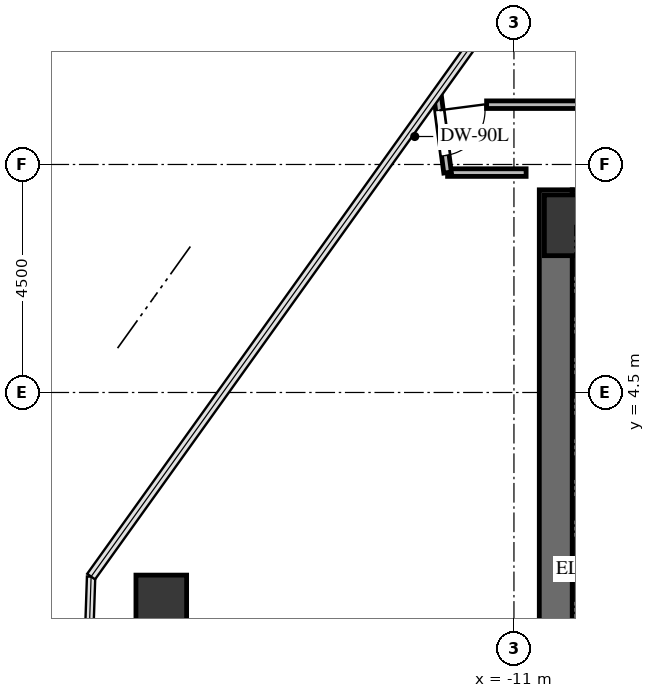
"""IFC4 building model, lengths in metres.
Left out: names, types, materials, properties, quantities, classifications, styles, units other than length and angle.
Written with IfcOpenShell. Run it as: python <this file> out.ifc"""

import sys

from ifc_helpers import new_model, si_unit, direction, frame, frame_2d, origin, origin_2d, place, context, subcontext, project, spatial, rectangle, extrude, source, transform, mapped, element, fill, save


model = new_model("IFC4")
c1 = context("Model", 3, precision=1e-05, world=origin(), true_north=direction((0.0, 1.0)))
c2 = subcontext(c1, "Body", "Model", "MODEL_VIEW")
j1 = project(units=[si_unit("LENGTHUNIT", "METRE"), si_unit("PLANEANGLEUNIT", "RADIAN")], contexts=[c1])
p1 = place(None, origin())
s1 = spatial("IfcSite", under=j1, at=p1, CompositionType="ELEMENT")
p2 = place(p1, origin())
s2 = spatial("IfcBuilding", under=s1, at=p2, CompositionType="ELEMENT")
p3 = place(p2, frame((0.0, 0.0, 180.4)))
s3 = spatial("IfcBuildingStorey", under=s2, at=p3, CompositionType="ELEMENT", Elevation=180.4)
p4 = place(p3, frame((-10.175, -8.5, 0.0), z_axis=(0.0, 0.0, 1.0), x_axis=(0.0, 1.0, 0.0)))
e1 = element("IfcWall", 1, at=p4, inside=s3, PredefinedType="SHEAR", context=c2, shape_type="SweptSolid", body=[
    extrude(rectangle(XDim=17.0, YDim=0.65, at=frame_2d((8.5, 0.0))), origin(), (0.0, 0.0, 1.0), 3.3),
])
p5 = place(p3, frame((-9.85, 8.175, 0.0), z_axis=(0.0, 0.0, 1.0), x_axis=(1.0, 0.0, 0.0)))
e2 = element("IfcWall", 2, at=p5, inside=s3, PredefinedType="SHEAR", context=c2, shape_type="SweptSolid", body=[
    extrude(rectangle(XDim=19.7, YDim=0.65, at=frame_2d((9.85, 0.0))), origin(), (0.0, 0.0, 1.0), 3.3),
])
m1 = source(origin(), c2, "Body", "SweptSolid", [
    extrude(rectangle(XDim=1.2, YDim=1.2, at=origin_2d()), origin(), (0.0, 0.0, 1.0), 3.3),
])
p6 = place(p3, frame((-9.8, 7.8, -0.24), z_axis=(0.0, 0.0, 1.0), x_axis=(1.0, 0.0, 0.0)))
e3 = element("IfcColumn", 3, at=p6, inside=s3, PredefinedType="COLUMN", context=c2, shape_type="MappedRepresentation", body=[
    mapped(m1, transform((0.0, 0.0, 0.0), x_axis=(1.0, 0.0, 0.0), y_axis=(0.0, 1.0, 0.0), z_axis=(0.0, 0.0, 1.0), scale=1.0)),
])
m2 = source(origin(), c2, "Body", "SweptSolid", [
    extrude(rectangle(XDim=1.0, YDim=1.0, at=origin_2d()), origin(), (0.0, 0.0, 1.0), 3.3),
])
p7 = place(p3, frame((-17.96, 0.396, -0.24), z_axis=(0.0, 0.0, 1.0), x_axis=(1.0, 0.0, 0.0)))
e4 = element("IfcColumn", 4, at=p7, inside=s3, PredefinedType="COLUMN", context=c2, shape_type="MappedRepresentation", body=[
    mapped(m2, transform((0.0, 0.0, 0.0), x_axis=(1.0, 0.0, 0.0), y_axis=(0.0, 1.0, 0.0), z_axis=(0.0, 0.0, 1.0), scale=1.0)),
])
p8 = place(p3, frame((-6.46, 10.18, 0.0), z_axis=(0.0, 0.0, 1.0), x_axis=(-1.0, 0.0, 0.0)))
e5 = element("IfcWall", 5, at=p8, inside=s3, PredefinedType="PARTITIONING", context=c2, shape_type="SweptSolid", body=[
    extrude(rectangle(XDim=5.08, YDim=0.15, at=frame_2d((2.54, 0.0))), origin(), (0.0, 0.0, 1.0), 2.242),
])
p9 = place(p8, frame((0.35, 0.0, 0.0)))
e6 = element("IfcOpeningElement", 6, at=p9, cuts=e5, PredefinedType="OPENING", context=c2, shape_type="SweptSolid", body=[
    extrude(rectangle(XDim=0.95, YDim=2.1, at=frame_2d((0.475, 1.05))), frame((0.0, 0.085, 0.0), z_axis=(0.0, -1.0, 0.0), x_axis=(1.0, 0.0, 0.0)), (0.0, 0.0, 1.0), 0.17),
])
p10 = place(p3, frame((-12.31, 8.84, 0.0), z_axis=(0.0, 0.0, 1.0), x_axis=(1.0, 0.0, 0.0)))
e7 = element("IfcWall", 7, at=p10, inside=s3, PredefinedType="PARTITIONING", context=c2, shape_type="SweptSolid", body=[
    extrude(rectangle(XDim=1.55, YDim=0.15, at=frame_2d((0.775, 0.0))), origin(), (0.0, 0.0, 1.0), 2.399),
])
p11 = place(p3, frame((-12.514, 10.406, 0.0), z_axis=(0.0, 0.0, 1.0), x_axis=(0.129378833178, -0.991595238757, 0.0)))
e8 = element("IfcWall", 8, at=p11, inside=s3, PredefinedType="PARTITIONING", context=c2, shape_type="SweptSolid", body=[
    extrude(rectangle(XDim=1.579, YDim=0.15, at=frame_2d((0.79, 0.0))), origin(), (0.0, 0.0, 1.0), 3.045),
])
p12 = place(p11, frame((0.34, 0.0, 0.0)))
e9 = element("IfcOpeningElement", 9, at=p12, cuts=e8, PredefinedType="OPENING", context=c2, shape_type="SweptSolid", body=[
    extrude(rectangle(XDim=0.9, YDim=2.05, at=frame_2d((0.45, 1.025))), frame((0.0, 0.085, 0.0), z_axis=(0.0, -1.0, 0.0), x_axis=(1.0, 0.0, 0.0)), (0.0, 0.0, 1.0), 0.17),
])
m3 = source(origin(), c2, "Body", "SweptSolid", [
    extrude(rectangle(XDim=0.9, YDim=2.05, at=frame_2d((0.45, 1.025))), frame((0.0, 0.025, 0.0), z_axis=(0.0, -1.0, 0.0), x_axis=(1.0, 0.0, 0.0)), (0.0, 0.0, 1.0), 0.05),
])
p13 = place(p12, origin())
e10 = element("IfcDoor", 10, at=p13, inside=s3, OperationType="SINGLE_SWING_LEFT", PredefinedType="DOOR", context=c2, shape_type="MappedRepresentation", body=[
    mapped(m3, transform((0.0, 0.0, 0.0), x_axis=(1.0, 0.0, 0.0), y_axis=(0.0, 1.0, 0.0), z_axis=(0.0, 0.0, 1.0), scale=1.0)),
])
fill(e9, e10)
save(model, sys.argv[1])
